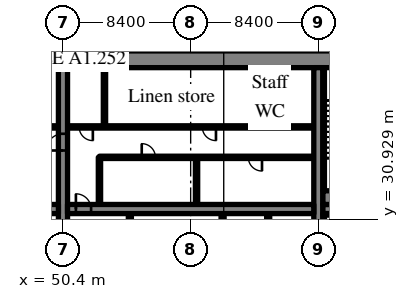
"""IFC4 building model, lengths in metres.
Left out: names, types, materials, properties, quantities, classifications, styles, units other than length and angle.
Written with IfcOpenShell. Run it as: python <this file> out.ifc"""

import sys

from ifc_helpers import new_model, si_unit, direction, frame, frame_2d, origin, place, context, subcontext, project, spatial, rectangle, extrude, source, transform, mapped, element, fill, save


model = new_model("IFC4")
c1 = context("Model", 3, precision=1e-05, world=origin(), true_north=direction((0.0, 1.0)))
c2 = subcontext(c1, "Body", "Model", "MODEL_VIEW")
j1 = project(units=[si_unit("LENGTHUNIT", "METRE"), si_unit("PLANEANGLEUNIT", "RADIAN")], contexts=[c1])
p1 = place(None, origin())
s1 = spatial("IfcSite", under=j1, at=p1, CompositionType="ELEMENT")
p2 = place(p1, origin())
s2 = spatial("IfcBuilding", under=s1, at=p2, CompositionType="ELEMENT")
p3 = place(p2, origin())
s3 = spatial("IfcBuildingStorey", under=s2, at=p3, CompositionType="ELEMENT", Elevation=0.0)
m1 = source(origin(), c2, "Body", "SweptSolid", [
    extrude(rectangle(XDim=50.4, YDim=1.1, at=frame_2d((25.2, 0.0))), origin(), (0.0, 0.0, 1.0), 5.72),
])
p4 = place(p3, frame((25.2, 41.45, 0.0), z_axis=(0.0, 0.0, 1.0), x_axis=(1.0, 0.0, 0.0)))
e1 = element("IfcWall", 1, at=p4, inside=s3, PredefinedType="SHEAR", context=c2, shape_type="MappedRepresentation", body=[
    mapped(m1, transform((0.0, 0.0, 0.0), scale=1.0)),
])
m2 = source(origin(), c2, "Body", "SweptSolid", [
    extrude(rectangle(XDim=1.2, YDim=2.1, at=frame_2d((0.6, 1.05))), frame((0.0, 0.56, 0.0), z_axis=(0.0, -1.0, 0.0), x_axis=(1.0, 0.0, 0.0)), (0.0, 0.0, 1.0), 1.12),
])
p5 = place(p4, frame((6.375, 0.0, 0.0)))
e2 = element("IfcOpeningElement", 2, at=p5, cuts=e1, PredefinedType="OPENING", context=c2, shape_type="MappedRepresentation", body=[
    mapped(m2, transform((0.0, 0.0, 0.0), scale=1.0)),
])
p6 = place(p4, frame((47.625, 0.0, 0.0)))
e3 = element("IfcOpeningElement", 3, at=p6, cuts=e1, PredefinedType="OPENING", context=c2, shape_type="MappedRepresentation", body=[
    mapped(m2, transform((0.0, 0.0, 0.0), scale=1.0)),
])
m3 = source(origin(), c2, "Body", "SweptSolid", [
    extrude(rectangle(XDim=17.8, YDim=0.6, at=frame_2d((8.9, 0.0))), origin(), (0.0, 0.0, 1.0), 5.72),
])
p7 = place(p3, frame((50.4, 23.1, 0.0), z_axis=(0.0, 0.0, 1.0), x_axis=(0.0, 1.0, 0.0)))
e4 = element("IfcWall", 4, at=p7, inside=s3, PredefinedType="SHEAR", context=c2, shape_type="MappedRepresentation", body=[
    mapped(m3, transform((0.0, 0.0, 0.0), scale=1.0)),
])
m4 = source(origin(), c2, "Body", "SweptSolid", [
    extrude(rectangle(XDim=1.1, YDim=2.1, at=frame_2d((0.55, 1.05))), frame((0.0, 0.31, 0.0), z_axis=(0.0, -1.0, 0.0), x_axis=(1.0, 0.0, 0.0)), (0.0, 0.0, 1.0), 0.62),
])
p8 = place(p7, frame((12.35, 0.0, 0.0)))
e5 = element("IfcOpeningElement", 5, at=p8, cuts=e4, PredefinedType="OPENING", context=c2, shape_type="MappedRepresentation", body=[
    mapped(m4, transform((0.0, 0.0, 0.0), scale=1.0)),
])
p9 = place(p3, frame((67.2, 23.1, 0.0), z_axis=(0.0, 0.0, 1.0), x_axis=(0.0, 1.0, 0.0)))
e6 = element("IfcWall", 6, at=p9, inside=s3, PredefinedType="SHEAR", context=c2, shape_type="MappedRepresentation", body=[
    mapped(m3, transform((0.0, 0.0, 0.0), scale=1.0)),
])
m5 = source(origin(), c2, "Body", "SweptSolid", [
    extrude(rectangle(XDim=16.2, YDim=0.6, at=frame_2d((8.1, 0.0))), origin(), (0.0, 0.0, 1.0), 5.72),
])
p10 = place(p3, frame((33.9, 31.6, 0.0), z_axis=(0.0, 0.0, 1.0), x_axis=(1.0, 0.0, 0.0)))
e7 = element("IfcWall", 7, at=p10, inside=s3, PredefinedType="SHEAR", context=c2, shape_type="MappedRepresentation", body=[
    mapped(m5, transform((0.0, 0.0, 0.0), scale=1.0)),
])
m6 = source(origin(), c2, "Body", "SweptSolid", [
    extrude(rectangle(XDim=1.0, YDim=2.1, at=frame_2d((0.5, 1.05))), frame((0.0, 0.31, 0.0), z_axis=(0.0, -1.0, 0.0), x_axis=(1.0, 0.0, 0.0)), (0.0, 0.0, 1.0), 0.62),
])
p11 = place(p10, frame((14.65, 0.0, 0.0)))
e8 = element("IfcOpeningElement", 8, at=p11, cuts=e7, PredefinedType="OPENING", context=c2, shape_type="MappedRepresentation", body=[
    mapped(m6, transform((0.0, 0.0, 0.0), scale=1.0)),
])
m7 = source(origin(), c2, "Body", "SweptSolid", [
    extrude(rectangle(XDim=16.2, YDim=0.6, at=frame_2d((8.1, 0.0))), origin(), (0.0, 0.0, 1.0), 5.72),
])
p12 = place(p3, frame((50.7, 31.6, 0.0), z_axis=(0.0, 0.0, 1.0), x_axis=(1.0, 0.0, 0.0)))
e9 = element("IfcWall", 9, at=p12, inside=s3, PredefinedType="SHEAR", context=c2, shape_type="MappedRepresentation", body=[
    mapped(m7, transform((0.0, 0.0, 0.0), scale=1.0)),
])
p13 = place(p12, frame((0.55, 0.0, 0.0)))
e10 = element("IfcOpeningElement", 10, at=p13, cuts=e9, PredefinedType="OPENING", context=c2, shape_type="MappedRepresentation", body=[
    mapped(m6, transform((0.0, 0.0, 0.0), scale=1.0)),
])
m8 = source(origin(), c2, "Body", "SweptSolid", [
    extrude(rectangle(XDim=7.0, YDim=0.6, at=frame_2d((3.5, 0.0))), origin(), (0.0, 0.0, 1.0), 5.72),
])
p14 = place(p3, frame((67.5, 31.6, 0.0), z_axis=(0.0, 0.0, 1.0), x_axis=(1.0, 0.0, 0.0)))
e11 = element("IfcWall", 11, at=p14, inside=s3, PredefinedType="SHEAR", context=c2, shape_type="MappedRepresentation", body=[
    mapped(m8, transform((0.0, 0.0, 0.0), scale=1.0)),
])
p15 = place(p14, frame((5.425, 0.0, 0.0)))
e12 = element("IfcOpeningElement", 12, at=p15, cuts=e11, PredefinedType="OPENING", context=c2, shape_type="MappedRepresentation", body=[
    mapped(m4, transform((0.0, 0.0, 0.0), scale=1.0)),
])
m9 = source(origin(), c2, "Body", "SweptSolid", [
    extrude(rectangle(XDim=16.2, YDim=0.15, at=frame_2d((8.1, 0.0))), origin(), (0.0, 0.0, 1.0), 5.72),
])
p16 = place(p3, frame((33.9, 37.0, 0.0), z_axis=(0.0, 0.0, 1.0), x_axis=(1.0, 0.0, 0.0)))
e13 = element("IfcWall", 13, at=p16, inside=s3, PredefinedType="PARTITIONING", context=c2, shape_type="MappedRepresentation", body=[
    mapped(m9, transform((0.0, 0.0, 0.0), scale=1.0)),
])
m10 = source(origin(), c2, "Body", "SweptSolid", [
    extrude(rectangle(XDim=0.9, YDim=2.1, at=frame_2d((0.45, 1.05))), frame((0.0, 0.085, 0.0), z_axis=(0.0, -1.0, 0.0), x_axis=(1.0, 0.0, 0.0)), (0.0, 0.0, 1.0), 0.17),
])
p17 = place(p16, frame((0.765, 0.0, 0.0)))
e14 = element("IfcOpeningElement", 14, at=p17, cuts=e13, PredefinedType="OPENING", context=c2, shape_type="MappedRepresentation", body=[
    mapped(m10, transform((0.0, 0.0, 0.0), scale=1.0)),
])
p18 = place(p16, frame((3.6, 0.0, 0.0)))
e15 = element("IfcOpeningElement", 15, at=p18, cuts=e13, PredefinedType="OPENING", context=c2, shape_type="MappedRepresentation", body=[
    mapped(m10, transform((0.0, 0.0, 0.0), scale=1.0)),
])
p19 = place(p16, frame((9.27, 0.0, 0.0)))
e16 = element("IfcOpeningElement", 16, at=p19, cuts=e13, PredefinedType="OPENING", context=c2, shape_type="MappedRepresentation", body=[
    mapped(m10, transform((0.0, 0.0, 0.0), scale=1.0)),
])
p20 = place(p16, frame((14.535, 0.0, 0.0)))
e17 = element("IfcOpeningElement", 17, at=p20, cuts=e13, PredefinedType="OPENING", context=c2, shape_type="MappedRepresentation", body=[
    mapped(m10, transform((0.0, 0.0, 0.0), scale=1.0)),
])
m11 = source(origin(), c2, "Body", "SweptSolid", [
    extrude(rectangle(XDim=8.2, YDim=0.2, at=frame_2d((4.1, 0.0))), origin(), (0.0, 0.0, 1.0), 5.72),
])
p21 = place(p3, frame((60.9, 23.1, 0.0), z_axis=(0.0, 0.0, 1.0), x_axis=(0.0, 1.0, 0.0)))
e18 = element("IfcWall", 18, at=p21, inside=s3, PredefinedType="PARTITIONING", context=c2, shape_type="MappedRepresentation", body=[
    mapped(m11, transform((0.0, 0.0, 0.0), scale=1.0)),
])
m12 = source(origin(), c2, "Body", "SweptSolid", [
    extrude(rectangle(XDim=0.9, YDim=2.1, at=frame_2d((0.45, 1.05))), frame((0.0, 0.11, 0.0), z_axis=(0.0, -1.0, 0.0), x_axis=(1.0, 0.0, 0.0)), (0.0, 0.0, 1.0), 0.22),
])
p22 = place(p21, frame((3.45, 0.0, 0.0)))
e19 = element("IfcOpeningElement", 19, at=p22, cuts=e18, PredefinedType="OPENING", context=c2, shape_type="MappedRepresentation", body=[
    mapped(m12, transform((0.0, 0.0, 0.0), scale=1.0)),
])
m13 = source(origin(), c2, "Body", "SweptSolid", [
    extrude(rectangle(XDim=2.5, YDim=0.2, at=frame_2d((1.25, 0.0))), origin(), (0.0, 0.0, 1.0), 5.72),
])
p23 = place(p3, frame((54.8, 28.8, 0.0), z_axis=(0.0, 0.0, 1.0), x_axis=(0.0, 1.0, 0.0)))
e20 = element("IfcWall", 20, at=p23, inside=s3, PredefinedType="SOLIDWALL", context=c2, shape_type="MappedRepresentation", body=[
    mapped(m13, transform((0.0, 0.0, 0.0), scale=1.0)),
])
p24 = place(p3, frame((63.9, 23.1, 0.0), z_axis=(0.0, 0.0, 1.0), x_axis=(0.0, 1.0, 0.0)))
e21 = element("IfcWall", 21, at=p24, inside=s3, PredefinedType="PARTITIONING", context=c2, shape_type="MappedRepresentation", body=[
    mapped(m11, transform((0.0, 0.0, 0.0), scale=1.0)),
])
m14 = source(origin(), c2, "Body", "SweptSolid", [
    extrude(rectangle(XDim=3.1, YDim=0.15, at=frame_2d((1.55, 0.0))), origin(), (0.0, 0.0, 1.0), 5.72),
])
p25 = place(p3, frame((52.8, 31.9, 0.0), z_axis=(0.0, 0.0, 1.0), x_axis=(0.0, 1.0, 0.0)))
e22 = element("IfcWall", 22, at=p25, inside=s3, PredefinedType="PARTITIONING", context=c2, shape_type="MappedRepresentation", body=[
    mapped(m14, transform((0.0, 0.0, 0.0), scale=1.0)),
])
m15 = source(origin(), c2, "Body", "SweptSolid", [
    extrude(rectangle(XDim=14.1, YDim=0.15, at=frame_2d((7.05, 0.0))), origin(), (0.0, 0.0, 1.0), 5.72),
])
p26 = place(p3, frame((66.9, 35.0, 0.0), z_axis=(0.0, 0.0, 1.0), x_axis=(-1.0, 0.0, 0.0)))
e23 = element("IfcWall", 23, at=p26, inside=s3, PredefinedType="PARTITIONING", context=c2, shape_type="MappedRepresentation", body=[
    mapped(m15, transform((0.0, 0.0, 0.0), scale=1.0)),
])
p27 = place(p26, frame((3.407, 0.0, 0.0)))
e24 = element("IfcOpeningElement", 24, at=p27, cuts=e23, PredefinedType="OPENING", context=c2, shape_type="MappedRepresentation", body=[
    mapped(m10, transform((0.0, 0.0, 0.0), scale=1.0)),
])
p28 = place(p26, frame((10.419, 0.0, 0.0)))
e25 = element("IfcOpeningElement", 25, at=p28, cuts=e23, PredefinedType="OPENING", context=c2, shape_type="MappedRepresentation", body=[
    mapped(m10, transform((0.0, 0.0, 0.0), scale=1.0)),
])
m16 = source(origin(), c2, "Body", "SweptSolid", [
    extrude(rectangle(XDim=16.2, YDim=0.15, at=frame_2d((8.1, 0.0))), origin(), (0.0, 0.0, 1.0), 5.72),
])
p29 = place(p3, frame((66.9, 37.0, 0.0), z_axis=(0.0, 0.0, 1.0), x_axis=(-1.0, 0.0, 0.0)))
e26 = element("IfcWall", 26, at=p29, inside=s3, PredefinedType="PARTITIONING", context=c2, shape_type="MappedRepresentation", body=[
    mapped(m16, transform((0.0, 0.0, 0.0), scale=1.0)),
])
p30 = place(p29, frame((6.435, 0.0, 0.0)))
e27 = element("IfcOpeningElement", 27, at=p30, cuts=e26, PredefinedType="OPENING", context=c2, shape_type="MappedRepresentation", body=[
    mapped(m10, transform((0.0, 0.0, 0.0), scale=1.0)),
])
p31 = place(p29, frame((14.535, 0.0, 0.0)))
e28 = element("IfcOpeningElement", 28, at=p31, cuts=e26, PredefinedType="OPENING", context=c2, shape_type="MappedRepresentation", body=[
    mapped(m10, transform((0.0, 0.0, 0.0), scale=1.0)),
])
p32 = place(p3, frame((59.186, 31.9, 0.0), z_axis=(0.0, 0.0, 1.0), x_axis=(0.0, 1.0, 0.0)))
e29 = element("IfcWall", 29, at=p32, inside=s3, PredefinedType="PARTITIONING", context=c2, shape_type="MappedRepresentation", body=[
    mapped(m14, transform((0.0, 0.0, 0.0), scale=1.0)),
])
m17 = source(origin(), c2, "Body", "SweptSolid", [
    extrude(rectangle(XDim=3.9, YDim=0.15, at=frame_2d((1.95, 0.0))), origin(), (0.0, 0.0, 1.0), 5.72),
])
p33 = place(p3, frame((53.13, 37.0, 0.0), z_axis=(0.0, 0.0, 1.0), x_axis=(0.0, 1.0, 0.0)))
e30 = element("IfcWall", 30, at=p33, inside=s3, PredefinedType="PARTITIONING", context=c2, shape_type="MappedRepresentation", body=[
    mapped(m17, transform((0.0, 0.0, 0.0), scale=1.0)),
])
m18 = source(origin(), c2, "Body", "SweptSolid", [
    extrude(rectangle(XDim=4.75, YDim=0.1, at=frame_2d((2.375, 0.0))), origin(), (0.0, 0.0, 1.0), 5.72),
])
p34 = place(p3, frame((67.5, 31.25, 0.0), z_axis=(0.0, 0.0, 1.0), x_axis=(1.0, 0.0, 0.0)))
e31 = element("IfcWall", 31, at=p34, inside=s3, PredefinedType="SOLIDWALL", context=c2, shape_type="MappedRepresentation", body=[
    mapped(m18, transform((0.0, 0.0, 0.0), scale=1.0)),
])
m19 = source(origin(), c2, "Body", "SweptSolid", [
    extrude(rectangle(XDim=8.1, YDim=0.1, at=frame_2d((4.05, 0.0))), origin(), (0.0, 0.0, 1.0), 5.72),
])
p35 = place(p3, frame((67.55, 23.1, 0.0), z_axis=(0.0, 0.0, 1.0), x_axis=(0.0, 1.0, 0.0)))
e32 = element("IfcWall", 32, at=p35, inside=s3, PredefinedType="SOLIDWALL", context=c2, shape_type="MappedRepresentation", body=[
    mapped(m19, transform((0.0, 0.0, 0.0), scale=1.0)),
])
m20 = source(origin(), c2, "Body", "SweptSolid", [
    extrude(rectangle(XDim=4.75, YDim=0.9, at=frame_2d((2.375, 0.0))), origin(), (0.0, 0.0, 1.0), 5.72),
])
p36 = place(p3, frame((67.5, 32.35, 0.0), z_axis=(0.0, 0.0, 1.0), x_axis=(1.0, 0.0, 0.0)))
e33 = element("IfcWall", 33, at=p36, inside=s3, PredefinedType="SOLIDWALL", context=c2, shape_type="MappedRepresentation", body=[
    mapped(m20, transform((0.0, 0.0, 0.0), scale=1.0)),
])
p37 = place(p3, frame((67.55, 32.8, 0.0), z_axis=(0.0, 0.0, 1.0), x_axis=(0.0, 1.0, 0.0)))
e34 = element("IfcWall", 34, at=p37, inside=s3, PredefinedType="SOLIDWALL", context=c2, shape_type="MappedRepresentation", body=[
    mapped(m19, transform((0.0, 0.0, 0.0), scale=1.0)),
])
m21 = source(origin(), c2, "Body", "SweptSolid", [
    extrude(rectangle(XDim=1.0, YDim=2.1, at=frame_2d((0.5, 1.05))), frame((0.0, 0.025, 0.0), z_axis=(0.0, -1.0, 0.0), x_axis=(1.0, 0.0, 0.0)), (0.0, 0.0, 1.0), 0.05),
])
p38 = place(p13, origin())
e35 = element("IfcDoor", 35, at=p38, inside=s3, OperationType="SINGLE_SWING_LEFT", PredefinedType="DOOR", context=c2, shape_type="MappedRepresentation", body=[
    mapped(m21, transform((0.0, 0.0, 0.0), scale=1.0)),
])
fill(e10, e35)
m22 = source(origin(), c2, "Body", "SweptSolid", [
    extrude(rectangle(XDim=0.9, YDim=2.1, at=frame_2d((0.45, 1.05))), frame((0.0, 0.025, 0.0), z_axis=(0.0, -1.0, 0.0), x_axis=(1.0, 0.0, 0.0)), (0.0, 0.0, 1.0), 0.05),
])
p39 = place(p27, origin())
e36 = element("IfcDoor", 36, at=p39, inside=s3, OperationType="SINGLE_SWING_LEFT", PredefinedType="DOOR", context=c2, shape_type="MappedRepresentation", body=[
    mapped(m22, transform((0.0, 0.0, 0.0), scale=1.0)),
])
fill(e24, e36)
p40 = place(p28, origin())
e37 = element("IfcDoor", 37, at=p40, inside=s3, OperationType="SINGLE_SWING_RIGHT", PredefinedType="DOOR", context=c2, shape_type="MappedRepresentation", body=[
    mapped(m22, transform((0.0, 0.0, 0.0), scale=1.0)),
])
fill(e25, e37)
p41 = place(p30, origin())
e38 = element("IfcDoor", 38, at=p41, inside=s3, OperationType="SINGLE_SWING_LEFT", PredefinedType="DOOR", context=c2, shape_type="MappedRepresentation", body=[
    mapped(m22, transform((0.0, 0.0, 0.0), scale=1.0)),
])
fill(e27, e38)
p42 = place(p31, origin())
e39 = element("IfcDoor", 39, at=p42, inside=s3, OperationType="SINGLE_SWING_LEFT", PredefinedType="DOOR", context=c2, shape_type="MappedRepresentation", body=[
    mapped(m22, transform((0.0, 0.0, 0.0), scale=1.0)),
])
fill(e28, e39)
m23 = source(origin(), c2, "Body", "SweptSolid", [
    extrude(rectangle(XDim=1.1, YDim=2.1, at=frame_2d((0.55, 1.05))), frame((0.0, 0.025, 0.0), z_axis=(0.0, -1.0, 0.0), x_axis=(1.0, 0.0, 0.0)), (0.0, 0.0, 1.0), 0.05),
])
p43 = place(p8, origin())
e40 = element("IfcDoor", 40, at=p43, inside=s3, OperationType="SINGLE_SWING_LEFT", PredefinedType="DOOR", context=c2, shape_type="MappedRepresentation", body=[
    mapped(m23, transform((0.0, 0.0, 0.0), scale=1.0)),
])
fill(e5, e40)
save(model, sys.argv[1])
